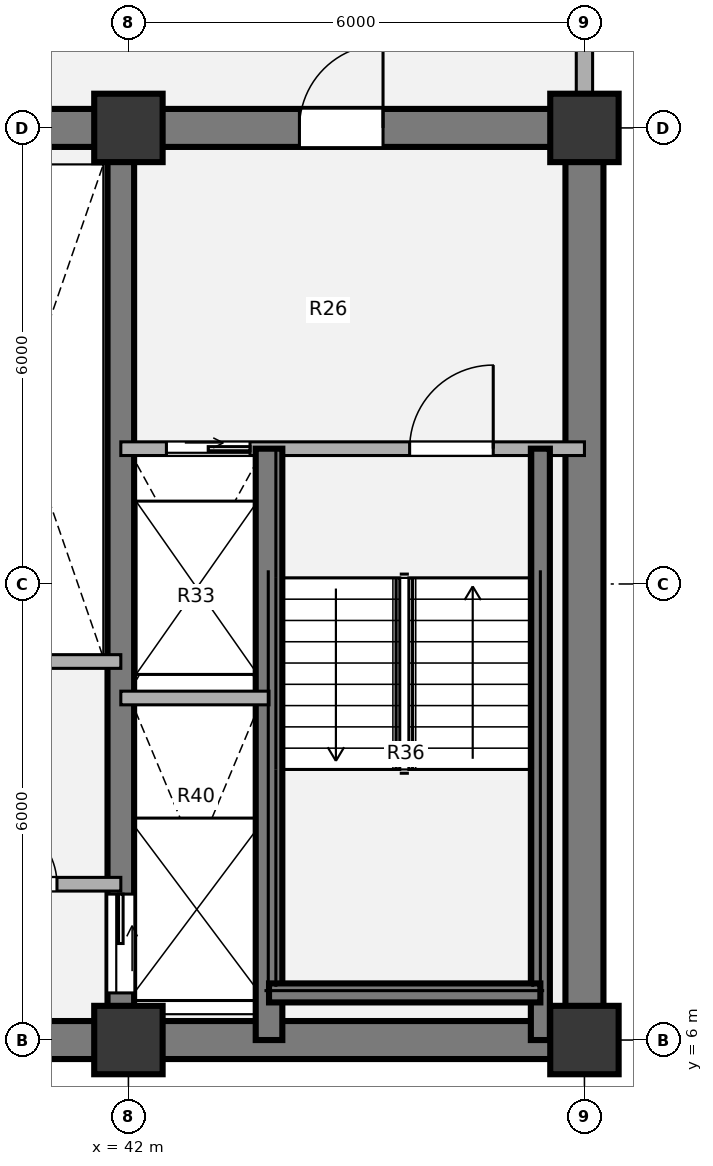
"""IFC4 building model, lengths in metres.
Left out: names, types, materials, properties, quantities, classifications, styles, units other than length and angle.
Written with IfcOpenShell. Run it as: python <this file> out.ifc"""

import sys

from ifc_helpers import new_model, si_unit, direction, frame, frame_2d, origin, origin_2d, place, context, subcontext, project, spatial, rectangle, extrude, source, transform, mapped, element, fill, save


model = new_model("IFC4")
c1 = context("Model", 3, precision=1e-05, world=origin(), true_north=direction((0.0, 1.0)))
c2 = subcontext(c1, "Body", "Model", "MODEL_VIEW")
j1 = project(units=[si_unit("LENGTHUNIT", "METRE"), si_unit("PLANEANGLEUNIT", "RADIAN")], contexts=[c1])
p1 = place(None, origin())
s1 = spatial("IfcSite", under=j1, at=p1, CompositionType="ELEMENT")
p2 = place(p1, origin())
s2 = spatial("IfcBuilding", under=s1, at=p2, CompositionType="ELEMENT")
p3 = place(p2, frame((0.0, 0.0, 89.82)))
s3 = spatial("IfcBuildingStorey", under=s2, at=p3, CompositionType="ELEMENT", Elevation=89.82)
m1 = source(origin(), c2, "Body", "SweptSolid", [
    extrude(rectangle(XDim=0.9, YDim=0.9, at=origin_2d()), origin(), (0.0, 0.0, 1.0), 3.78),
])
for number, where, z_axis, x_axis in (
    (1, (42.0, 6.0, 0.0), (0.0, 0.0, 1.0), (1.0, 0.0, 0.0)),
    (2, (48.0, 6.0, 0.0), (0.0, 0.0, 1.0), (1.0, 0.0, 0.0)),
    (3, (42.0, 18.0, 0.0), (0.0, 0.0, 1.0), (1.0, 0.0, 0.0)),
    (4, (48.0, 18.0, 0.0), (0.0, 0.0, 1.0), (1.0, 0.0, 0.0)),
):
    element("IfcColumn", number, at=place(p3, frame(where, z_axis=z_axis, x_axis=x_axis)), inside=s3, PredefinedType="COLUMN", context=c2, shape_type="MappedRepresentation", body=[
        mapped(m1, transform((0.0, 0.0, 0.0), x_axis=(1.0, 0.0, 0.0), y_axis=(0.0, 1.0, 0.0), z_axis=(0.0, 0.0, 1.0), scale=1.0)),
    ])
p4 = place(p3, frame((48.25, 6.0, 0.0), z_axis=(0.0, 0.0, 1.0), x_axis=(-1.0, 0.0, 0.0)))
e5 = element("IfcWall", 5, at=p4, inside=s3, PredefinedType="SHEAR", context=c2, shape_type="SweptSolid", body=[
    extrude(rectangle(XDim=24.5, YDim=0.5, at=frame_2d((12.25, 0.0))), origin(), (0.0, 0.0, 1.0), 3.78),
])
p5 = place(p3, frame((48.0, 18.0, 0.0), z_axis=(0.0, 0.0, 1.0), x_axis=(0.0, -1.0, 0.0)))
e6 = element("IfcWall", 6, at=p5, inside=s3, PredefinedType="SHEAR", context=c2, shape_type="SweptSolid", body=[
    extrude(rectangle(XDim=12.0, YDim=0.5, at=frame_2d((6.0, 0.0))), origin(), (0.0, 0.0, 1.0), 3.78),
])
p6 = place(p3, frame((38.8, 18.0, 0.0), z_axis=(0.0, 0.0, 1.0), x_axis=(1.0, 0.0, 0.0)))
e7 = element("IfcWall", 7, at=p6, inside=s3, PredefinedType="SHEAR", context=c2, shape_type="SweptSolid", body=[
    extrude(rectangle(XDim=9.45, YDim=0.5, at=frame_2d((4.725, 0.0))), origin(), (0.0, 0.0, 1.0), 3.78),
])
p7 = place(p6, frame((5.45, 0.0, 0.0)))
e8 = element("IfcOpeningElement", 8, at=p7, cuts=e7, PredefinedType="OPENING", context=c2, shape_type="SweptSolid", body=[
    extrude(rectangle(XDim=1.1, YDim=2.1, at=origin_2d()), frame((0.55, 0.26, 1.05), z_axis=(0.0, -1.0, 0.0), x_axis=(1.0, 0.0, 0.0)), (0.0, 0.0, 1.0), 0.52),
])
p8 = place(p3, frame((41.9, 18.0, 0.0), z_axis=(0.0, 0.0, 1.0), x_axis=(0.0, -1.0, 0.0)))
e9 = element("IfcWall", 9, at=p8, inside=s3, PredefinedType="SHEAR", context=c2, shape_type="SweptSolid", body=[
    extrude(rectangle(XDim=12.0, YDim=0.35, at=frame_2d((6.0, 0.0))), origin(), (0.0, 0.0, 1.0), 3.78),
])
p9 = place(p8, frame((10.08, 0.0, 0.0)))
e10 = element("IfcOpeningElement", 10, at=p9, cuts=e9, PredefinedType="OPENING", context=c2, shape_type="SweptSolid", body=[
    extrude(rectangle(XDim=1.3, YDim=2.1, at=origin_2d()), frame((0.65, 0.185, 1.05), z_axis=(0.0, -1.0, 0.0), x_axis=(1.0, 0.0, 0.0)), (0.0, 0.0, 1.0), 0.37),
])
p10 = place(p3, frame((48.0, 21.05, 0.0), z_axis=(0.0, 0.0, 1.0), x_axis=(0.0, -1.0, 0.0)))
e11 = element("IfcWall", 11, at=p10, inside=s3, PredefinedType="SOLIDWALL", context=c2, shape_type="SweptSolid", body=[
    extrude(rectangle(XDim=2.62, YDim=0.215, at=frame_2d((1.31, 0.0))), origin(), (0.0, 0.0, 1.0), 3.53),
])
p11 = place(p3, frame((39.35, 10.98, 0.0), z_axis=(0.0, 0.0, 1.0), x_axis=(1.0, 0.0, 0.0)))
e12 = element("IfcWall", 12, at=p11, inside=s3, PredefinedType="PARTITIONING", context=c2, shape_type="SweptSolid", body=[
    extrude(rectangle(XDim=2.55, YDim=0.18, at=frame_2d((1.275, 0.0))), origin(), (0.0, 0.0, 1.0), 3.5),
])
p12 = place(p3, frame((39.35, 8.05, 0.0), z_axis=(0.0, 0.0, 1.0), x_axis=(1.0, 0.0, 0.0)))
e13 = element("IfcWall", 13, at=p12, inside=s3, PredefinedType="PARTITIONING", context=c2, shape_type="SweptSolid", body=[
    extrude(rectangle(XDim=2.55, YDim=0.18, at=frame_2d((1.275, 0.0))), origin(), (0.0, 0.0, 1.0), 3.5),
])
p13 = place(p12, frame((0.85, 0.0, 0.0)))
e14 = element("IfcOpeningElement", 14, at=p13, cuts=e13, PredefinedType="OPENING", context=c2, shape_type="SweptSolid", body=[
    extrude(rectangle(XDim=0.86, YDim=2.1, at=origin_2d()), frame((0.43, 0.1, 1.05), z_axis=(0.0, -1.0, 0.0), x_axis=(1.0, 0.0, 0.0)), (0.0, 0.0, 1.0), 0.2),
])
p14 = place(p3, frame((41.9, 13.78, 0.0), z_axis=(0.0, 0.0, 1.0), x_axis=(1.0, 0.0, 0.0)))
e15 = element("IfcWall", 15, at=p14, inside=s3, PredefinedType="PARTITIONING", context=c2, shape_type="SweptSolid", body=[
    extrude(rectangle(XDim=6.1, YDim=0.18, at=frame_2d((3.05, 0.0))), origin(), (0.0, 0.0, 1.0), 3.5),
])
p15 = place(p14, frame((0.6, 0.0, 0.0)))
e16 = element("IfcOpeningElement", 16, at=p15, cuts=e15, PredefinedType="OPENING", context=c2, shape_type="SweptSolid", body=[
    extrude(rectangle(XDim=1.1, YDim=2.1, at=origin_2d()), frame((0.55, 0.1, 1.05), z_axis=(0.0, -1.0, 0.0), x_axis=(1.0, 0.0, 0.0)), (0.0, 0.0, 1.0), 0.2),
])
p16 = place(p14, frame((3.8, 0.0, 0.0)))
e17 = element("IfcOpeningElement", 17, at=p16, cuts=e15, PredefinedType="OPENING", context=c2, shape_type="SweptSolid", body=[
    extrude(rectangle(XDim=1.1, YDim=2.1, at=origin_2d()), frame((0.55, 0.1, 1.05), z_axis=(0.0, -1.0, 0.0), x_axis=(1.0, 0.0, 0.0)), (0.0, 0.0, 1.0), 0.2),
])
p17 = place(p3, frame((43.85, 6.0, 0.0), z_axis=(0.0, 0.0, 1.0), x_axis=(0.0, 1.0, 0.0)))
e18 = element("IfcWall", 18, at=p17, inside=s3, PredefinedType="SHEAR", context=c2, shape_type="SweptSolid", body=[
    extrude(rectangle(XDim=7.78, YDim=0.35, at=frame_2d((3.89, 0.0))), origin(), (0.0, 0.0, 1.0), 3.85),
])
p18 = place(p3, frame((47.42, 6.0, 0.0), z_axis=(0.0, 0.0, 1.0), x_axis=(0.0, 1.0, 0.0)))
e19 = element("IfcWall", 19, at=p18, inside=s3, PredefinedType="SHEAR", context=c2, shape_type="SweptSolid", body=[
    extrude(rectangle(XDim=7.78, YDim=0.25, at=frame_2d((3.89, 0.0))), origin(), (0.0, 0.0, 1.0), 3.85),
])
p19 = place(p3, frame((43.85, 6.62, 0.0), z_axis=(0.0, 0.0, 1.0), x_axis=(1.0, 0.0, 0.0)))
e20 = element("IfcWall", 20, at=p19, inside=s3, PredefinedType="SHEAR", context=c2, shape_type="SweptSolid", body=[
    extrude(rectangle(XDim=3.57, YDim=0.25, at=frame_2d((1.785, 0.0))), origin(), (0.0, 0.0, 1.0), 3.85),
])
p20 = place(p3, frame((41.9, 10.5, 0.0), z_axis=(0.0, 0.0, 1.0), x_axis=(1.0, 0.0, 0.0)))
e21 = element("IfcWall", 21, at=p20, inside=s3, PredefinedType="PARTITIONING", context=c2, shape_type="SweptSolid", body=[
    extrude(rectangle(XDim=1.95, YDim=0.18, at=frame_2d((0.975, 0.0))), origin(), (0.0, 0.0, 1.0), 3.5),
])
m2 = source(origin(), c2, "Body", "SweptSolid", [
    extrude(rectangle(XDim=0.86, YDim=2.1, at=origin_2d()), frame((0.43, 0.025, 1.05), z_axis=(0.0, -1.0, 0.0), x_axis=(1.0, 0.0, 0.0)), (0.0, 0.0, 1.0), 0.05),
])
p21 = place(p13, origin())
e22 = element("IfcDoor", 22, at=p21, inside=s3, OperationType="SINGLE_SWING_LEFT", PredefinedType="DOOR", context=c2, shape_type="MappedRepresentation", body=[
    mapped(m2, transform((0.0, 0.0, 0.0), x_axis=(1.0, 0.0, 0.0), y_axis=(0.0, 1.0, 0.0), z_axis=(0.0, 0.0, 1.0), scale=1.0)),
])
fill(e14, e22)
m3 = source(origin(), c2, "Body", "SweptSolid", [
    extrude(rectangle(XDim=1.1, YDim=2.1, at=origin_2d()), frame((0.55, 0.025, 1.05), z_axis=(0.0, -1.0, 0.0), x_axis=(1.0, 0.0, 0.0)), (0.0, 0.0, 1.0), 0.05),
])
p22 = place(p15, origin())
e23 = element("IfcDoor", 23, at=p22, inside=s3, OperationType="SLIDING_TO_RIGHT", PredefinedType="DOOR", context=c2, shape_type="MappedRepresentation", body=[
    mapped(m3, transform((0.0, 0.0, 0.0), x_axis=(1.0, 0.0, 0.0), y_axis=(0.0, 1.0, 0.0), z_axis=(0.0, 0.0, 1.0), scale=1.0)),
])
fill(e16, e23)
m4 = source(origin(), c2, "Body", "SweptSolid", [
    extrude(rectangle(XDim=1.1, YDim=2.1, at=origin_2d()), frame((0.55, 0.025, 1.05), z_axis=(0.0, -1.0, 0.0), x_axis=(1.0, 0.0, 0.0)), (0.0, 0.0, 1.0), 0.05),
])
p23 = place(p16, origin())
e24 = element("IfcDoor", 24, at=p23, inside=s3, OperationType="SINGLE_SWING_RIGHT", PredefinedType="DOOR", context=c2, shape_type="MappedRepresentation", body=[
    mapped(m4, transform((0.0, 0.0, 0.0), x_axis=(1.0, 0.0, 0.0), y_axis=(0.0, 1.0, 0.0), z_axis=(0.0, 0.0, 1.0), scale=1.0)),
])
fill(e17, e24)
m5 = source(origin(), c2, "Body", "SweptSolid", [
    extrude(rectangle(XDim=1.3, YDim=2.1, at=origin_2d()), frame((0.65, 0.025, 1.05), z_axis=(0.0, -1.0, 0.0), x_axis=(1.0, 0.0, 0.0)), (0.0, 0.0, 1.0), 0.05),
])
p24 = place(p9, origin())
e25 = element("IfcDoor", 25, at=p24, inside=s3, OperationType="SLIDING_TO_LEFT", PredefinedType="DOOR", context=c2, shape_type="MappedRepresentation", body=[
    mapped(m5, transform((0.0, 0.0, 0.0), x_axis=(1.0, 0.0, 0.0), y_axis=(0.0, 1.0, 0.0), z_axis=(0.0, 0.0, 1.0), scale=1.0)),
])
fill(e10, e25)
m6 = source(origin(), c2, "Body", "SweptSolid", [
    extrude(rectangle(XDim=1.1, YDim=2.1, at=origin_2d()), frame((0.55, 0.025, 1.05), z_axis=(0.0, -1.0, 0.0), x_axis=(1.0, 0.0, 0.0)), (0.0, 0.0, 1.0), 0.05),
])
p25 = place(p7, origin())
e26 = element("IfcDoor", 26, at=p25, inside=s3, OperationType="SINGLE_SWING_RIGHT", PredefinedType="DOOR", context=c2, shape_type="MappedRepresentation", body=[
    mapped(m6, transform((0.0, 0.0, 0.0), x_axis=(1.0, 0.0, 0.0), y_axis=(0.0, 1.0, 0.0), z_axis=(0.0, 0.0, 1.0), scale=1.0)),
])
fill(e8, e26)
save(model, sys.argv[1])
